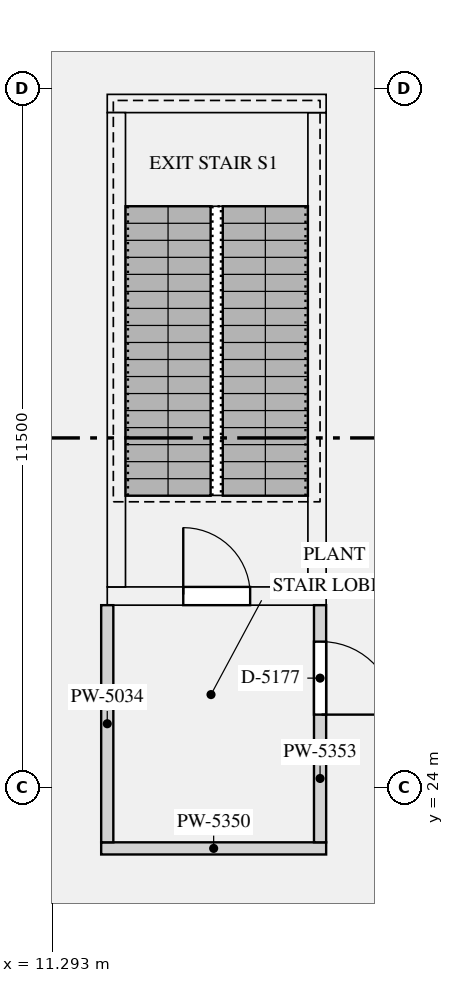
"""IFC4 building model, lengths in metres.
Left out: names, types, materials, properties, quantities, classifications, styles, units other than length and angle.
Written with IfcOpenShell. Run it as: python <this file> out.ifc"""

import sys

from ifc_helpers import new_model, si_unit, direction, frame, frame_2d, origin, place, context, subcontext, project, spatial, rectangle, extrude, element, fill, save


model = new_model("IFC4")
c1 = context("Model", 3, precision=1e-05, world=origin(), true_north=direction((0.0, 1.0)))
c2 = subcontext(c1, "Body", "Model", "MODEL_VIEW")
j1 = project(units=[si_unit("LENGTHUNIT", "METRE"), si_unit("PLANEANGLEUNIT", "RADIAN")], contexts=[c1])
p1 = place(None, origin())
s1 = spatial("IfcSite", under=j1, at=p1, CompositionType="ELEMENT")
p2 = place(p1, origin())
s2 = spatial("IfcBuilding", under=s1, at=p2, CompositionType="ELEMENT")
p3 = place(p2, frame((0.0, 0.0, 130.8)))
s3 = spatial("IfcBuildingStorey", under=s2, at=p3, CompositionType="ELEMENT", Elevation=130.8)
p4 = place(p3, frame((12.2, 27.15, 0.0), z_axis=(0.0, 0.0, 1.0), x_axis=(1.0, 0.0, 0.0)))
e1 = element("IfcWall", 1, at=p4, inside=s3, PredefinedType="SHEAR", context=c2, shape_type="SweptSolid", body=[
    extrude(rectangle(XDim=3.6, YDim=0.3, at=frame_2d((1.8, 0.0))), origin(), (0.0, 0.0, 1.0), 6.3),
])
p5 = place(p4, frame((1.25, 0.0, 0.0)))
e2 = element("IfcOpeningElement", 2, at=p5, cuts=e1, PredefinedType="OPENING", context=c2, shape_type="SweptSolid", body=[
    extrude(rectangle(XDim=1.1, YDim=2.1, at=frame_2d((0.55, 1.05))), frame((0.0, 0.16, 0.0), z_axis=(0.0, -1.0, 0.0), x_axis=(1.0, 0.0, 0.0)), (0.0, 0.0, 1.0), 0.32),
])
p6 = place(p3, frame((12.2, 35.25, 0.0), z_axis=(0.0, 0.0, 1.0), x_axis=(1.0, 0.0, 0.0)))
e3 = element("IfcWall", 3, at=p6, inside=s3, PredefinedType="SHEAR", context=c2, shape_type="SweptSolid", body=[
    extrude(rectangle(XDim=3.6, YDim=0.3, at=frame_2d((1.8, 0.0))), origin(), (0.0, 0.0, 1.0), 6.3),
])
for number, where, z_axis, x_axis in (
    (4, (12.35, 27.3, 0.0), (0.0, 0.0, 1.0), (0.0, 1.0, 0.0)),
    (5, (15.65, 27.3, 0.0), (0.0, 0.0, 1.0), (0.0, 1.0, 0.0)),
):
    element("IfcWall", number, at=place(p3, frame(where, z_axis=z_axis, x_axis=x_axis)), inside=s3, PredefinedType="SHEAR", context=c2, shape_type="SweptSolid", body=[
        extrude(rectangle(XDim=7.8, YDim=0.3, at=frame_2d((3.9, 0.0))), origin(), (0.0, 0.0, 1.0), 6.3),
    ])
p7 = place(p3, frame((12.1, 23.0, 0.0), z_axis=(0.0, 0.0, 1.0), x_axis=(1.0, 0.0, 0.0)))
e6 = element("IfcWall", 6, at=p7, inside=s3, PredefinedType="PARTITIONING", context=c2, shape_type="SweptSolid", body=[
    extrude(rectangle(XDim=3.7, YDim=0.2, at=frame_2d((1.85, 0.0))), origin(), (0.0, 0.0, 1.0), 5.8),
])
p8 = place(p3, frame((12.2, 23.1, 0.0), z_axis=(0.0, 0.0, 1.0), x_axis=(0.0, 1.0, 0.0)))
e7 = element("IfcWall", 7, at=p8, inside=s3, PredefinedType="PARTITIONING", context=c2, shape_type="SweptSolid", body=[
    extrude(rectangle(XDim=3.9, YDim=0.2, at=frame_2d((1.95, 0.0))), origin(), (0.0, 0.0, 1.0), 5.8),
])
p9 = place(p3, frame((15.7, 23.1, 0.0), z_axis=(0.0, 0.0, 1.0), x_axis=(0.0, 1.0, 0.0)))
e8 = element("IfcWall", 8, at=p9, inside=s3, PredefinedType="PARTITIONING", context=c2, shape_type="SweptSolid", body=[
    extrude(rectangle(XDim=3.9, YDim=0.2, at=frame_2d((1.95, 0.0))), origin(), (0.0, 0.0, 1.0), 5.8),
])
p10 = place(p9, frame((2.1, 0.0, 0.0)))
e9 = element("IfcOpeningElement", 9, at=p10, cuts=e8, PredefinedType="OPENING", context=c2, shape_type="SweptSolid", body=[
    extrude(rectangle(XDim=1.2, YDim=2.1, at=frame_2d((0.6, 1.05))), frame((0.0, 0.11, 0.0), z_axis=(0.0, -1.0, 0.0), x_axis=(1.0, 0.0, 0.0)), (0.0, 0.0, 1.0), 0.22),
])
p11 = place(p5, origin())
e10 = element("IfcDoor", 10, at=p11, inside=s3, OperationType="SINGLE_SWING_LEFT", PredefinedType="DOOR", context=c2, shape_type="SweptSolid", body=[
    extrude(rectangle(XDim=1.1, YDim=2.1, at=frame_2d((0.55, 1.05))), frame((0.0, 0.025, 0.0), z_axis=(0.0, -1.0, 0.0), x_axis=(1.0, 0.0, 0.0)), (0.0, 0.0, 1.0), 0.05),
])
fill(e2, e10)
p12 = place(p10, frame((1.2, 0.0, 0.0), z_axis=(0.0, 0.0, 1.0), x_axis=(-1.0, 0.0, 0.0)))
e11 = element("IfcDoor", 11, at=p12, inside=s3, OperationType="SINGLE_SWING_RIGHT", PredefinedType="DOOR", context=c2, shape_type="SweptSolid", body=[
    extrude(rectangle(XDim=1.2, YDim=2.1, at=frame_2d((0.6, 1.05))), frame((0.0, 0.025, 0.0), z_axis=(0.0, -1.0, 0.0), x_axis=(1.0, 0.0, 0.0)), (0.0, 0.0, 1.0), 0.05),
])
fill(e9, e11)
save(model, sys.argv[1])
